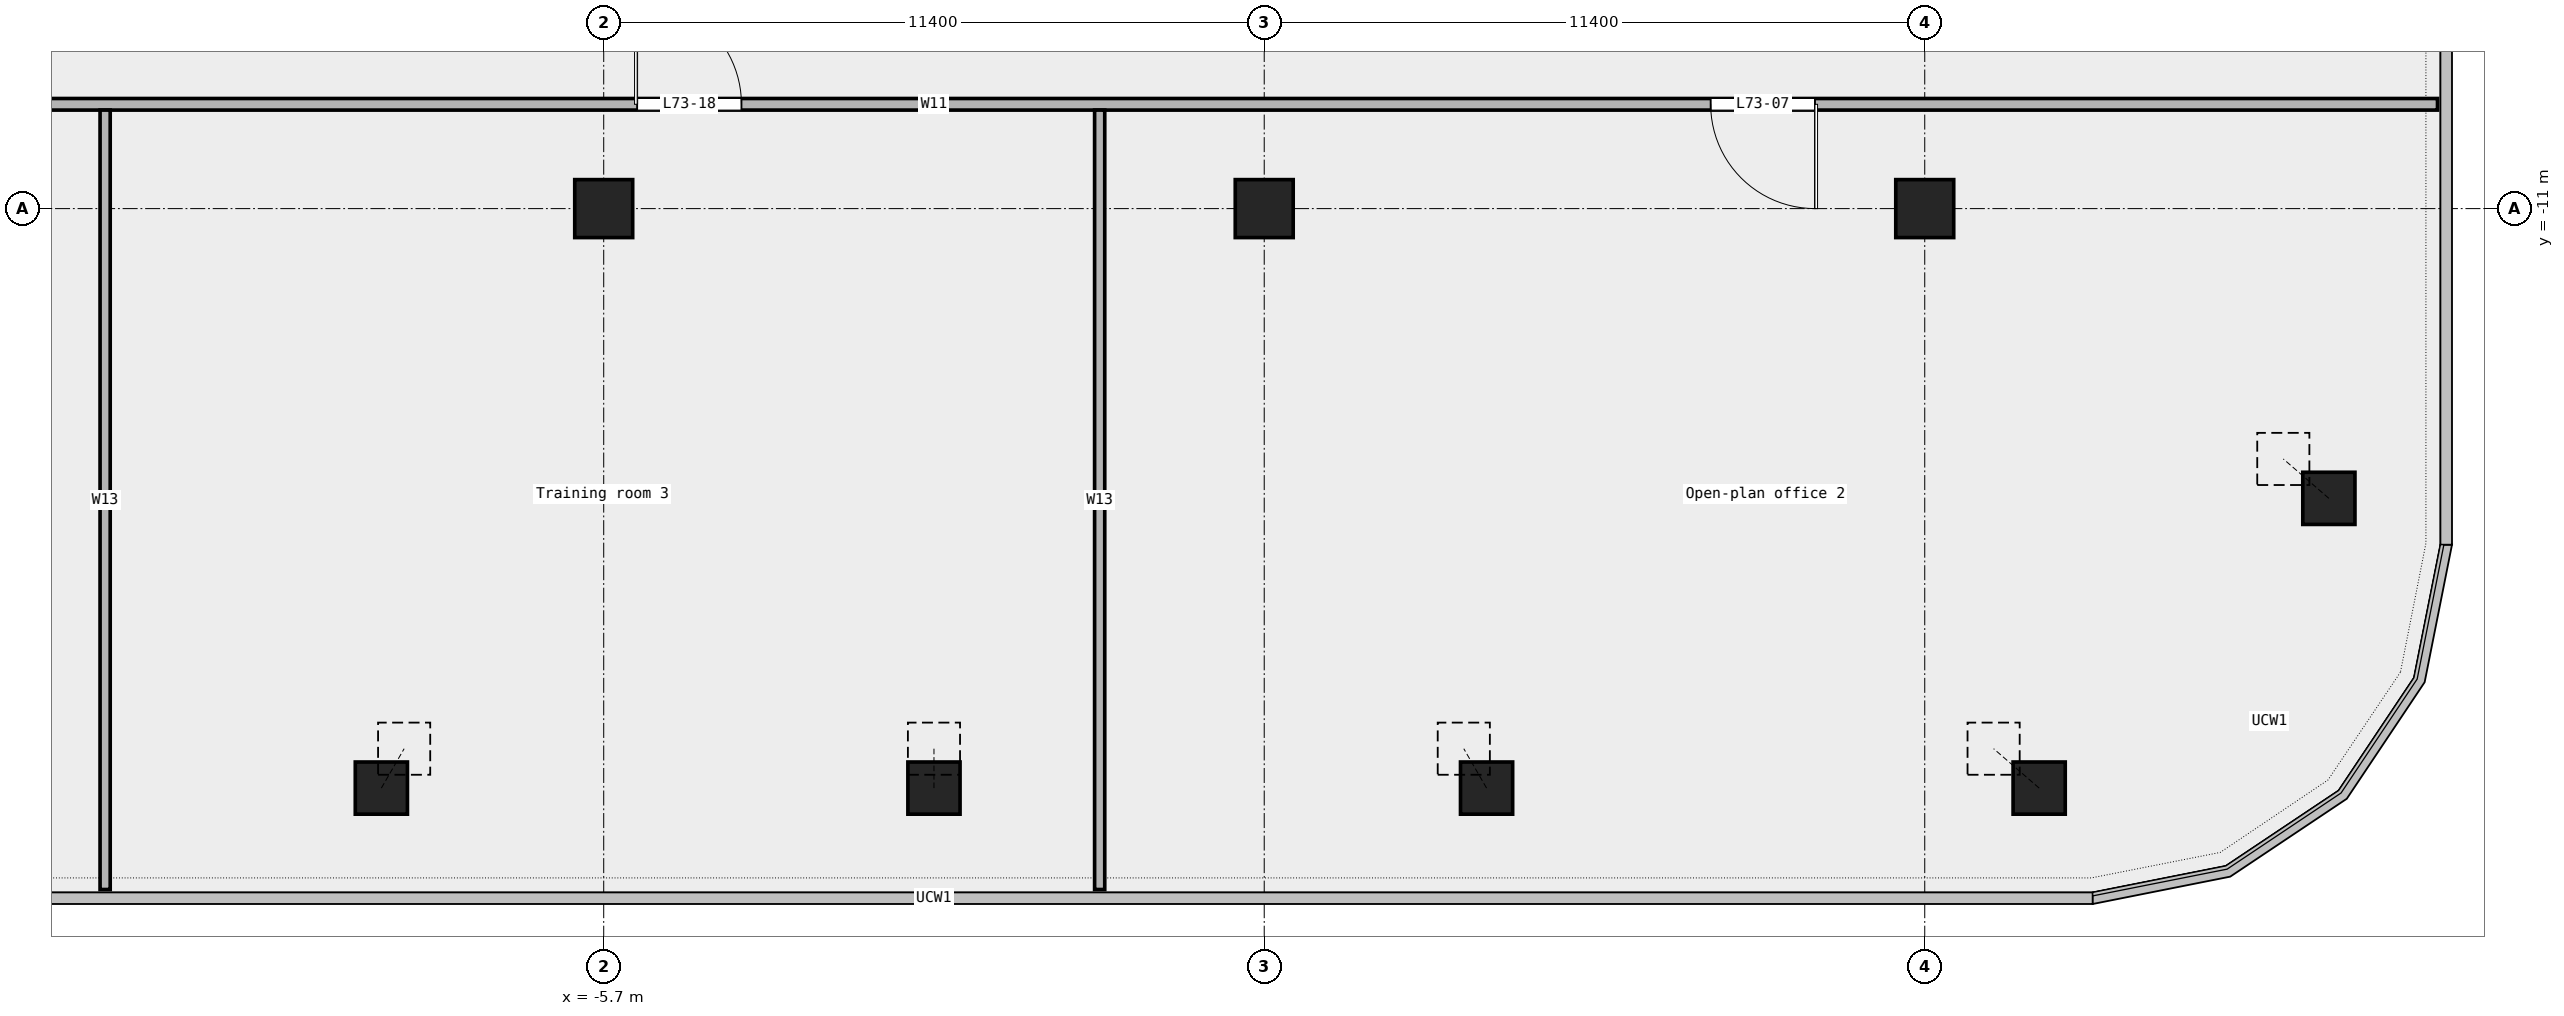
"""IFC4 building model, lengths in metres.
Left out: names, types, materials, properties, quantities, classifications, styles, units other than length and angle.
Written with IfcOpenShell. Run it as: python <this file> out.ifc"""

import sys

from ifc_helpers import new_model, si_unit, direction, frame, frame_2d, origin, origin_2d, place, context, subcontext, project, spatial, rectangle, extrude, element, fill, save


model = new_model("IFC4")
c1 = context("Model", 3, precision=1e-05, world=origin(), true_north=direction((0.0, 1.0)))
c2 = subcontext(c1, "Body", "Model", "MODEL_VIEW")
j1 = project(units=[si_unit("LENGTHUNIT", "METRE"), si_unit("PLANEANGLEUNIT", "RADIAN")], contexts=[c1])
p1 = place(None, origin())
s1 = spatial("IfcSite", under=j1, at=p1, CompositionType="ELEMENT")
p2 = place(p1, origin())
s2 = spatial("IfcBuilding", under=s1, at=p2, CompositionType="ELEMENT")
p3 = place(p2, frame((0.0, 0.0, 333.4)))
s3 = spatial("IfcBuildingStorey", under=s2, at=p3, CompositionType="ELEMENT", Elevation=333.4)
p4 = place(p3, frame((-9.538, -21.0, 0.0), z_axis=(0.112706165104, 0.194839646068, 0.974338151089), x_axis=(-0.865610650408, 0.500717686825, 0.0)))
e1 = element("IfcColumn", 1, at=p4, inside=s3, PredefinedType="COLUMN", context=c2, shape_type="SweptSolid", body=[
    extrude(rectangle(XDim=0.9, YDim=0.9, at=origin_2d()), origin(), (0.0, 0.0, 1.0), 3.49),
])
p5 = place(p3, frame((0.0, -21.0, 0.0), z_axis=(0.0, 0.19608905468, 0.980586091394), x_axis=(-1.0, 0.0, 0.0)))
e2 = element("IfcColumn", 2, at=p5, inside=s3, PredefinedType="COLUMN", context=c2, shape_type="SweptSolid", body=[
    extrude(rectangle(XDim=0.9, YDim=0.9, at=origin_2d()), origin(), (0.0, 0.0, 1.0), 3.468),
])
p6 = place(p3, frame((9.538, -21.0, 0.0), z_axis=(-0.112706165104, 0.194839646068, 0.974338151089), x_axis=(-0.865610650408, -0.500717686825, 0.0)))
e3 = element("IfcColumn", 3, at=p6, inside=s3, PredefinedType="COLUMN", context=c2, shape_type="SweptSolid", body=[
    extrude(rectangle(XDim=0.9, YDim=0.9, at=origin_2d()), origin(), (0.0, 0.0, 1.0), 3.49),
])
for number, where, z_axis, x_axis in (
    (4, (19.075, -21.0, 0.0), (-0.221, 0.191, 0.956), (-0.654, -0.756, 0.0)),
    (5, (24.075, -16.0, 0.0), (-0.221, 0.191, 0.956), (-0.654, -0.756, 0.0)),
):
    element("IfcColumn", number, at=place(p3, frame(where, z_axis=z_axis, x_axis=x_axis)), inside=s3, PredefinedType="COLUMN", context=c2, shape_type="SweptSolid", body=[
        extrude(rectangle(XDim=0.9, YDim=0.9, at=origin_2d()), origin(), (0.0, 0.0, 1.0), 3.555),
    ])
for number, where, z_axis, x_axis in (
    (6, (-5.7, -11.0, 0.0), (0.0, 0.0, 1.0), (1.0, 0.0, 0.0)),
    (7, (5.7, -11.0, 0.0), (0.0, 0.0, 1.0), (1.0, 0.0, 0.0)),
    (8, (17.1, -11.0, 0.0), (0.0, 0.0, 1.0), (1.0, 0.0, 0.0)),
):
    element("IfcColumn", number, at=place(p3, frame(where, z_axis=z_axis, x_axis=x_axis)), inside=s3, PredefinedType="COLUMN", context=c2, shape_type="SweptSolid", body=[
        extrude(rectangle(XDim=1.0, YDim=1.0, at=origin_2d()), origin(), (0.0, 0.0, 1.0), 3.4),
    ])
p7 = place(p3, frame((-25.95, -9.2, 0.0), z_axis=(0.0, 0.0, 1.0), x_axis=(1.0, 0.0, 0.0)))
e9 = element("IfcWall", 9, at=p7, inside=s3, PredefinedType="PARTITIONING", context=c2, shape_type="SweptSolid", body=[
    extrude(rectangle(XDim=51.9, YDim=0.2, at=frame_2d((25.95, 0.0))), origin(), (0.0, 0.0, 1.0), 3.4),
])
p8 = place(p7, frame((39.355, 0.0, 0.0)))
e10 = element("IfcOpeningElement", 10, at=p8, cuts=e9, PredefinedType="OPENING", context=c2, shape_type="SweptSolid", body=[
    extrude(rectangle(XDim=1.8, YDim=2.1, at=frame_2d((0.9, 1.05))), frame((0.0, 0.112, 0.0), z_axis=(0.0, -1.0, 0.0), x_axis=(1.0, 0.0, 0.0)), (0.0, 0.0, 1.0), 0.224),
])
p9 = place(p7, frame((5.173, 0.0, 0.0)))
e11 = element("IfcOpeningElement", 11, at=p9, cuts=e9, PredefinedType="OPENING", context=c2, shape_type="SweptSolid", body=[
    extrude(rectangle(XDim=1.5, YDim=2.1, at=frame_2d((0.75, 1.05))), frame((0.0, 0.112, 0.0), z_axis=(0.0, -1.0, 0.0), x_axis=(1.0, 0.0, 0.0)), (0.0, 0.0, 1.0), 0.224),
])
p10 = place(p7, frame((20.827, 0.0, 0.0)))
e12 = element("IfcOpeningElement", 12, at=p10, cuts=e9, PredefinedType="OPENING", context=c2, shape_type="SweptSolid", body=[
    extrude(rectangle(XDim=1.8, YDim=2.1, at=frame_2d((0.9, 1.05))), frame((0.0, 0.112, 0.0), z_axis=(0.0, -1.0, 0.0), x_axis=(1.0, 0.0, 0.0)), (0.0, 0.0, 1.0), 0.224),
])
for number, where, z_axis, x_axis in (
    (13, (-14.305, -22.75, 0.0), (0.0, 0.0, 1.0), (0.0, 1.0, 0.0)),
    (14, (2.86, -22.75, 0.0), (0.0, 0.0, 1.0), (0.0, 1.0, 0.0)),
):
    element("IfcWall", number, at=place(p3, frame(where, z_axis=z_axis, x_axis=x_axis)), inside=s3, PredefinedType="PARTITIONING", context=c2, shape_type="SweptSolid", body=[
        extrude(rectangle(XDim=13.45, YDim=0.175, at=frame_2d((6.725, 0.0))), origin(), (0.0, 0.0, 1.0), 3.4),
    ])
p11 = place(p8, origin())
e15 = element("IfcDoor", 15, at=p11, inside=s3, OperationType="DOUBLE_DOOR_SINGLE_SWING", PredefinedType="DOOR", context=c2, shape_type="SweptSolid", body=[
    extrude(rectangle(XDim=1.8, YDim=2.1, at=frame_2d((0.9, 1.05))), frame((0.0, 0.025, 0.0), z_axis=(0.0, -1.0, 0.0), x_axis=(1.0, 0.0, 0.0)), (0.0, 0.0, 1.0), 0.05),
])
fill(e10, e15)
p12 = place(p10, origin())
e16 = element("IfcDoor", 16, at=p12, inside=s3, OperationType="DOUBLE_DOOR_SINGLE_SWING", PredefinedType="DOOR", context=c2, shape_type="SweptSolid", body=[
    extrude(rectangle(XDim=1.8, YDim=2.1, at=frame_2d((0.9, 1.05))), frame((0.0, 0.025, 0.0), z_axis=(0.0, -1.0, 0.0), x_axis=(1.0, 0.0, 0.0)), (0.0, 0.0, 1.0), 0.05),
])
fill(e12, e16)
save(model, sys.argv[1])
